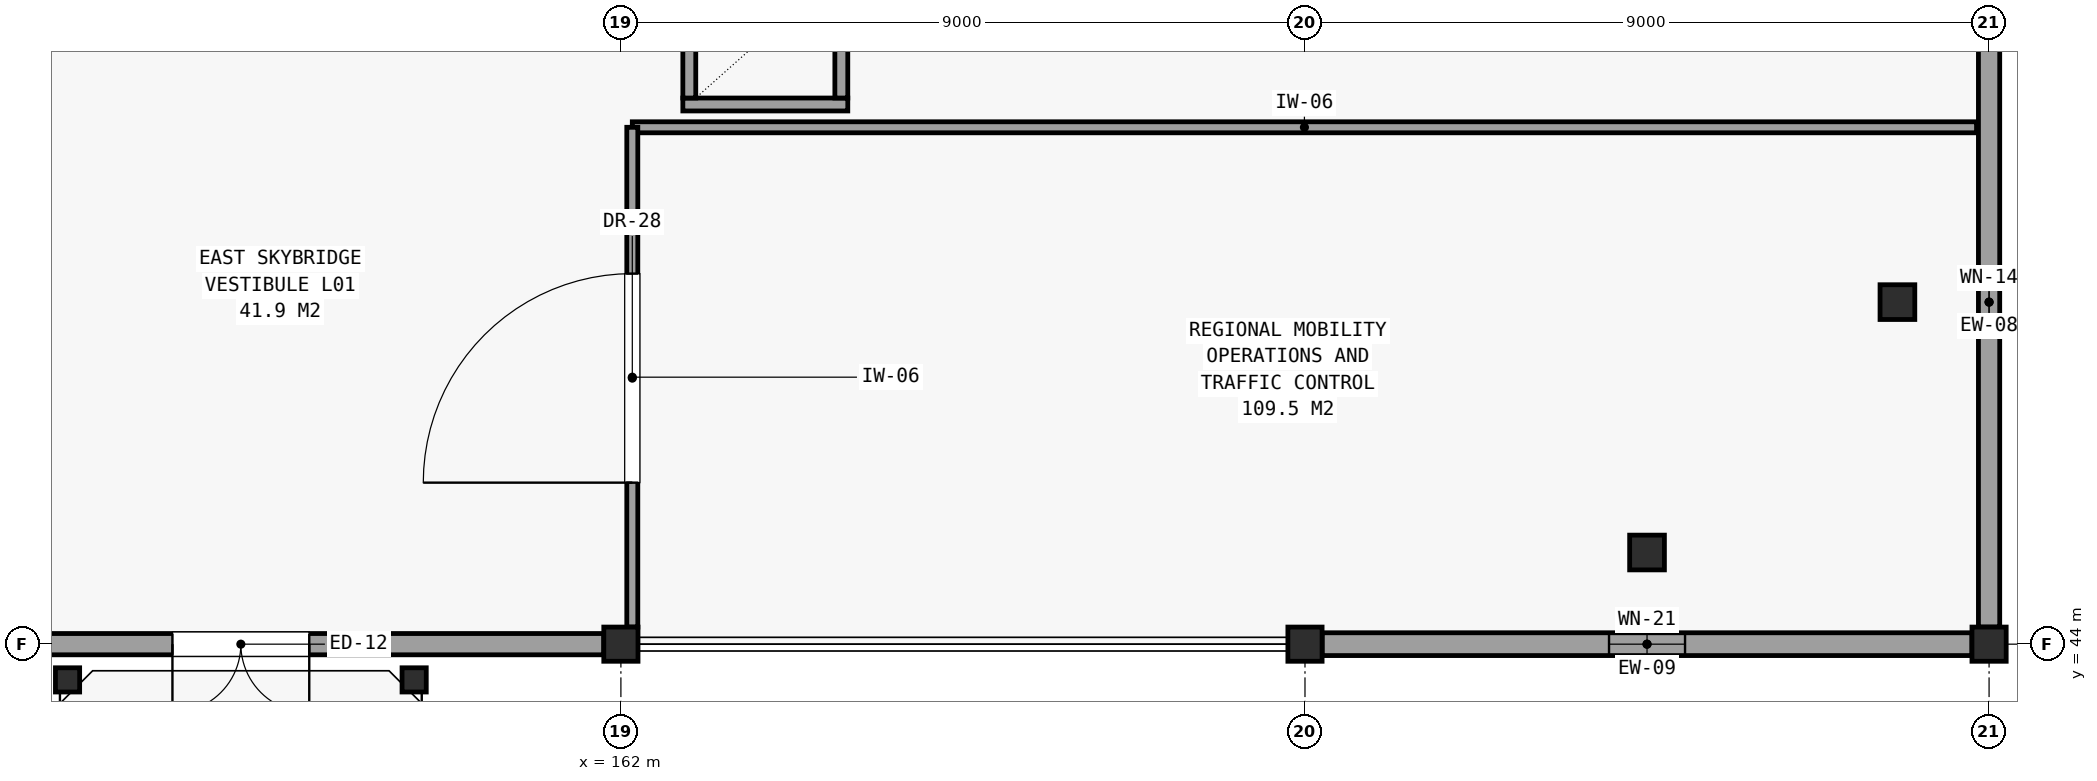
"""IFC4 building model, lengths in metres.
Left out: names, types, materials, properties, quantities, classifications, styles, units other than length and angle.
Written with IfcOpenShell. Run it as: python <this file> out.ifc"""

import sys

from ifc_helpers import new_model, si_unit, direction, frame, frame_2d, origin, origin_2d, place, context, subcontext, project, spatial, rectangle, hollow_rectangle, hollow_circle, extrude, element, fill, save


model = new_model("IFC4")
c1 = context("Model", 3, precision=1e-05, world=origin(), true_north=direction((0.0, 1.0)))
c2 = subcontext(c1, "Body", "Model", "MODEL_VIEW")
j1 = project(units=[si_unit("LENGTHUNIT", "METRE"), si_unit("PLANEANGLEUNIT", "RADIAN")], contexts=[c1])
p1 = place(None, origin())
s1 = spatial("IfcSite", under=j1, at=p1, CompositionType="ELEMENT")
p2 = place(p1, origin())
s2 = spatial("IfcBuilding", under=s1, at=p2, CompositionType="ELEMENT")
p3 = place(p2, frame((0.0, 0.0, 5.1)))
s3 = spatial("IfcBuildingStorey", under=s2, at=p3, CompositionType="ELEMENT", Elevation=5.1)
for number, where, z_axis, x_axis in (
    (1, (154.72, 43.53, 0.0), (0.0, 0.0, 1.0), (1.0, 0.0, 0.0)),
    (2, (159.28, 43.53, 0.0), (0.0, 0.0, 1.0), (1.0, 0.0, 0.0)),
):
    element("IfcColumn", number, at=place(p3, frame(where, z_axis=z_axis, x_axis=x_axis)), inside=s3, PredefinedType="COLUMN", context=c2, shape_type="SweptSolid", body=[
        extrude(hollow_circle(Radius=0.159, WallThickness=0.01, at=origin_2d()), origin(), (0.0, 0.0, 1.0), 4.2),
    ])
for number, where, z_axis, x_axis in (
    (3, (162.0, 44.0, 0.0), (0.0, 0.0, 1.0), (1.0, 0.0, 0.0)),
    (4, (171.0, 44.0, 0.0), (0.0, 0.0, 1.0), (1.0, 0.0, 0.0)),
):
    element("IfcColumn", number, at=place(p3, frame(where, z_axis=z_axis, x_axis=x_axis)), inside=s3, PredefinedType="COLUMN", context=c2, shape_type="SweptSolid", body=[
        extrude(hollow_rectangle(XDim=0.45, YDim=0.45, WallThickness=0.022, at=origin_2d()), origin(), (0.0, 0.0, 1.0), 4.2),
    ])
for number, where, z_axis, x_axis in (
    (5, (175.5, 45.206, 0.0), (0.0, 0.0, 1.0), (1.0, 0.0, 0.0)),
    (6, (178.794, 48.5, 0.0), (0.0, 0.0, 1.0), (1.0, 0.0, 0.0)),
):
    element("IfcColumn", number, at=place(p3, frame(where, z_axis=z_axis, x_axis=x_axis)), inside=s3, PredefinedType="COLUMN", context=c2, shape_type="SweptSolid", body=[
        extrude(hollow_circle(Radius=0.229, WallThickness=0.016, at=origin_2d()), origin(), (0.0, 0.0, 1.0), 4.2),
    ])
p4 = place(p3, frame((180.0, 44.0, 0.0), z_axis=(0.0, 0.0, 1.0), x_axis=(1.0, 0.0, 0.0)))
e7 = element("IfcColumn", 7, at=p4, inside=s3, PredefinedType="COLUMN", context=c2, shape_type="SweptSolid", body=[
    extrude(hollow_rectangle(XDim=0.45, YDim=0.45, WallThickness=0.022, at=origin_2d()), origin(), (0.0, 0.0, 1.0), 4.2),
])
p5 = place(p3, frame((153.225, 44.0, 0.0), z_axis=(0.0, 0.0, 1.0), x_axis=(1.0, 0.0, 0.0)))
e8 = element("IfcWall", 8, at=p5, inside=s3, PredefinedType="SOLIDWALL", context=c2, shape_type="SweptSolid", body=[
    extrude(rectangle(XDim=8.55, YDim=0.28, at=frame_2d((4.275, 0.0))), origin(), (0.0, 0.0, 1.0), 3.362),
])
p6 = place(p5, frame((4.675, 0.0, 0.0), z_axis=(0.0, 0.0, 1.0), x_axis=(-1.0, 0.0, 0.0)))
e9 = element("IfcOpeningElement", 9, at=p6, cuts=e8, PredefinedType="OPENING", context=c2, shape_type="SweptSolid", body=[
    extrude(rectangle(XDim=1.8, YDim=2.2, at=frame_2d((0.9, 1.1))), frame((0.0, 0.151, 0.0), z_axis=(0.0, -1.0, 0.0), x_axis=(1.0, 0.0, 0.0)), (0.0, 0.0, 1.0), 0.302),
])
p7 = place(p3, frame((171.225, 44.0, 0.0), z_axis=(0.0, 0.0, 1.0), x_axis=(1.0, 0.0, 0.0)))
e10 = element("IfcWall", 10, at=p7, inside=s3, PredefinedType="SOLIDWALL", context=c2, shape_type="SweptSolid", body=[
    extrude(rectangle(XDim=8.55, YDim=0.3, at=frame_2d((4.275, 0.0))), origin(), (0.0, 0.0, 1.0), 3.362),
])
p8 = place(p7, frame((3.775, 0.0, 0.95)))
e11 = element("IfcOpeningElement", 11, at=p8, cuts=e10, PredefinedType="OPENING", context=c2, shape_type="SweptSolid", body=[
    extrude(rectangle(XDim=1.0, YDim=1.4, at=frame_2d((0.5, 0.7))), frame((0.0, 0.161, 0.0), z_axis=(0.0, -1.0, 0.0), x_axis=(1.0, 0.0, 0.0)), (0.0, 0.0, 1.0), 0.322),
])
p9 = place(p3, frame((180.0, 44.225, 0.0), z_axis=(0.0, 0.0, 1.0), x_axis=(0.0, 1.0, 0.0)))
e12 = element("IfcWall", 12, at=p9, inside=s3, PredefinedType="SOLIDWALL", context=c2, shape_type="SweptSolid", body=[
    extrude(rectangle(XDim=8.55, YDim=0.28, at=frame_2d((4.275, 0.0))), origin(), (0.0, 0.0, 1.0), 3.3),
])
p10 = place(p9, frame((3.825, 0.0, 0.95)))
e13 = element("IfcOpeningElement", 13, at=p10, cuts=e12, PredefinedType="OPENING", context=c2, shape_type="SweptSolid", body=[
    extrude(rectangle(XDim=0.9, YDim=1.3, at=frame_2d((0.45, 0.65))), frame((0.0, 0.151, 0.0), z_axis=(0.0, -1.0, 0.0), x_axis=(1.0, 0.0, 0.0)), (0.0, 0.0, 1.0), 0.302),
])
p11 = place(p3, frame((162.815, 51.1, 0.0), z_axis=(0.0, 0.0, 1.0), x_axis=(1.0, 0.0, 0.0)))
e14 = element("IfcWall", 14, at=p11, inside=s3, PredefinedType="PARTITIONING", context=c2, shape_type="SweptSolid", body=[
    extrude(rectangle(XDim=2.17, YDim=0.17, at=frame_2d((1.085, 0.0))), origin(), (0.0, 0.0, 1.0), 3.92),
])
for number, where, z_axis, x_axis in (
    (15, (162.9, 51.185, 0.0), (0.0, 0.0, 1.0), (0.0, 1.0, 0.0)),
    (16, (164.9, 51.185, 0.0), (0.0, 0.0, 1.0), (0.0, 1.0, 0.0)),
):
    element("IfcWall", number, at=place(p3, frame(where, z_axis=z_axis, x_axis=x_axis)), inside=s3, PredefinedType="PARTITIONING", context=c2, shape_type="SweptSolid", body=[
        extrude(rectangle(XDim=1.63, YDim=0.17, at=frame_2d((0.815, 0.0))), origin(), (0.0, 0.0, 1.0), 3.362),
    ])
p12 = place(p3, frame((162.15, 50.8, 0.0), z_axis=(0.0, 0.0, 1.0), x_axis=(1.0, 0.0, 0.0)))
e17 = element("IfcWall", 17, at=p12, inside=s3, PredefinedType="PARTITIONING", context=c2, shape_type="SweptSolid", body=[
    extrude(rectangle(XDim=17.685, YDim=0.145, at=frame_2d((8.843, 0.0))), origin(), (0.0, 0.0, 1.0), 3.3),
])
p13 = place(p3, frame((162.15, 44.225, 0.0), z_axis=(0.0, 0.0, 1.0), x_axis=(0.0, 1.0, 0.0)))
e18 = element("IfcWall", 18, at=p13, inside=s3, PredefinedType="PARTITIONING", context=c2, shape_type="SweptSolid", body=[
    extrude(rectangle(XDim=6.575, YDim=0.145, at=frame_2d((3.288, 0.0))), origin(), (0.0, 0.0, 1.0), 3.3),
])
p14 = place(p13, frame((1.9, 0.0, 0.0)))
e19 = element("IfcOpeningElement", 19, at=p14, cuts=e18, PredefinedType="OPENING", context=c2, shape_type="SweptSolid", body=[
    extrude(rectangle(XDim=2.75, YDim=2.7, at=frame_2d((1.375, 1.35))), frame((0.0, 0.083, 0.0), z_axis=(0.0, -1.0, 0.0), x_axis=(1.0, 0.0, 0.0)), (0.0, 0.0, 1.0), 0.167),
])
p15 = place(p6, origin())
e20 = element("IfcDoor", 20, at=p15, inside=s3, OperationType="SINGLE_SWING_LEFT", PredefinedType="DOOR", context=c2, shape_type="SweptSolid", body=[
    extrude(rectangle(XDim=1.8, YDim=2.2, at=frame_2d((0.9, 1.1))), frame((0.0, 0.025, 0.0), z_axis=(0.0, -1.0, 0.0), x_axis=(1.0, 0.0, 0.0)), (0.0, 0.0, 1.0), 0.05),
])
fill(e9, e20)
p16 = place(p8, origin())
e21 = element("IfcWindow", 21, at=p16, inside=s3, PartitioningType="SINGLE_PANEL", PredefinedType="WINDOW", context=c2, shape_type="SweptSolid", body=[
    extrude(rectangle(XDim=1.0, YDim=1.4, at=frame_2d((0.5, 0.7))), frame((0.0, 0.03, 0.0), z_axis=(0.0, -1.0, 0.0), x_axis=(1.0, 0.0, 0.0)), (0.0, 0.0, 1.0), 0.06),
])
fill(e11, e21)
p17 = place(p10, origin())
e22 = element("IfcWindow", 22, at=p17, inside=s3, PartitioningType="SINGLE_PANEL", PredefinedType="WINDOW", context=c2, shape_type="SweptSolid", body=[
    extrude(rectangle(XDim=0.9, YDim=1.3, at=frame_2d((0.45, 0.65))), frame((0.0, 0.03, 0.0), z_axis=(0.0, -1.0, 0.0), x_axis=(1.0, 0.0, 0.0)), (0.0, 0.0, 1.0), 0.06),
])
fill(e13, e22)
p18 = place(p14, origin())
e23 = element("IfcDoor", 23, at=p18, inside=s3, OperationType="SINGLE_SWING_LEFT", PredefinedType="DOOR", context=c2, shape_type="SweptSolid", body=[
    extrude(rectangle(XDim=2.75, YDim=2.7, at=frame_2d((1.375, 1.35))), frame((0.0, 0.025, 0.0), z_axis=(0.0, -1.0, 0.0), x_axis=(1.0, 0.0, 0.0)), (0.0, 0.0, 1.0), 0.05),
])
fill(e19, e23)
save(model, sys.argv[1])
